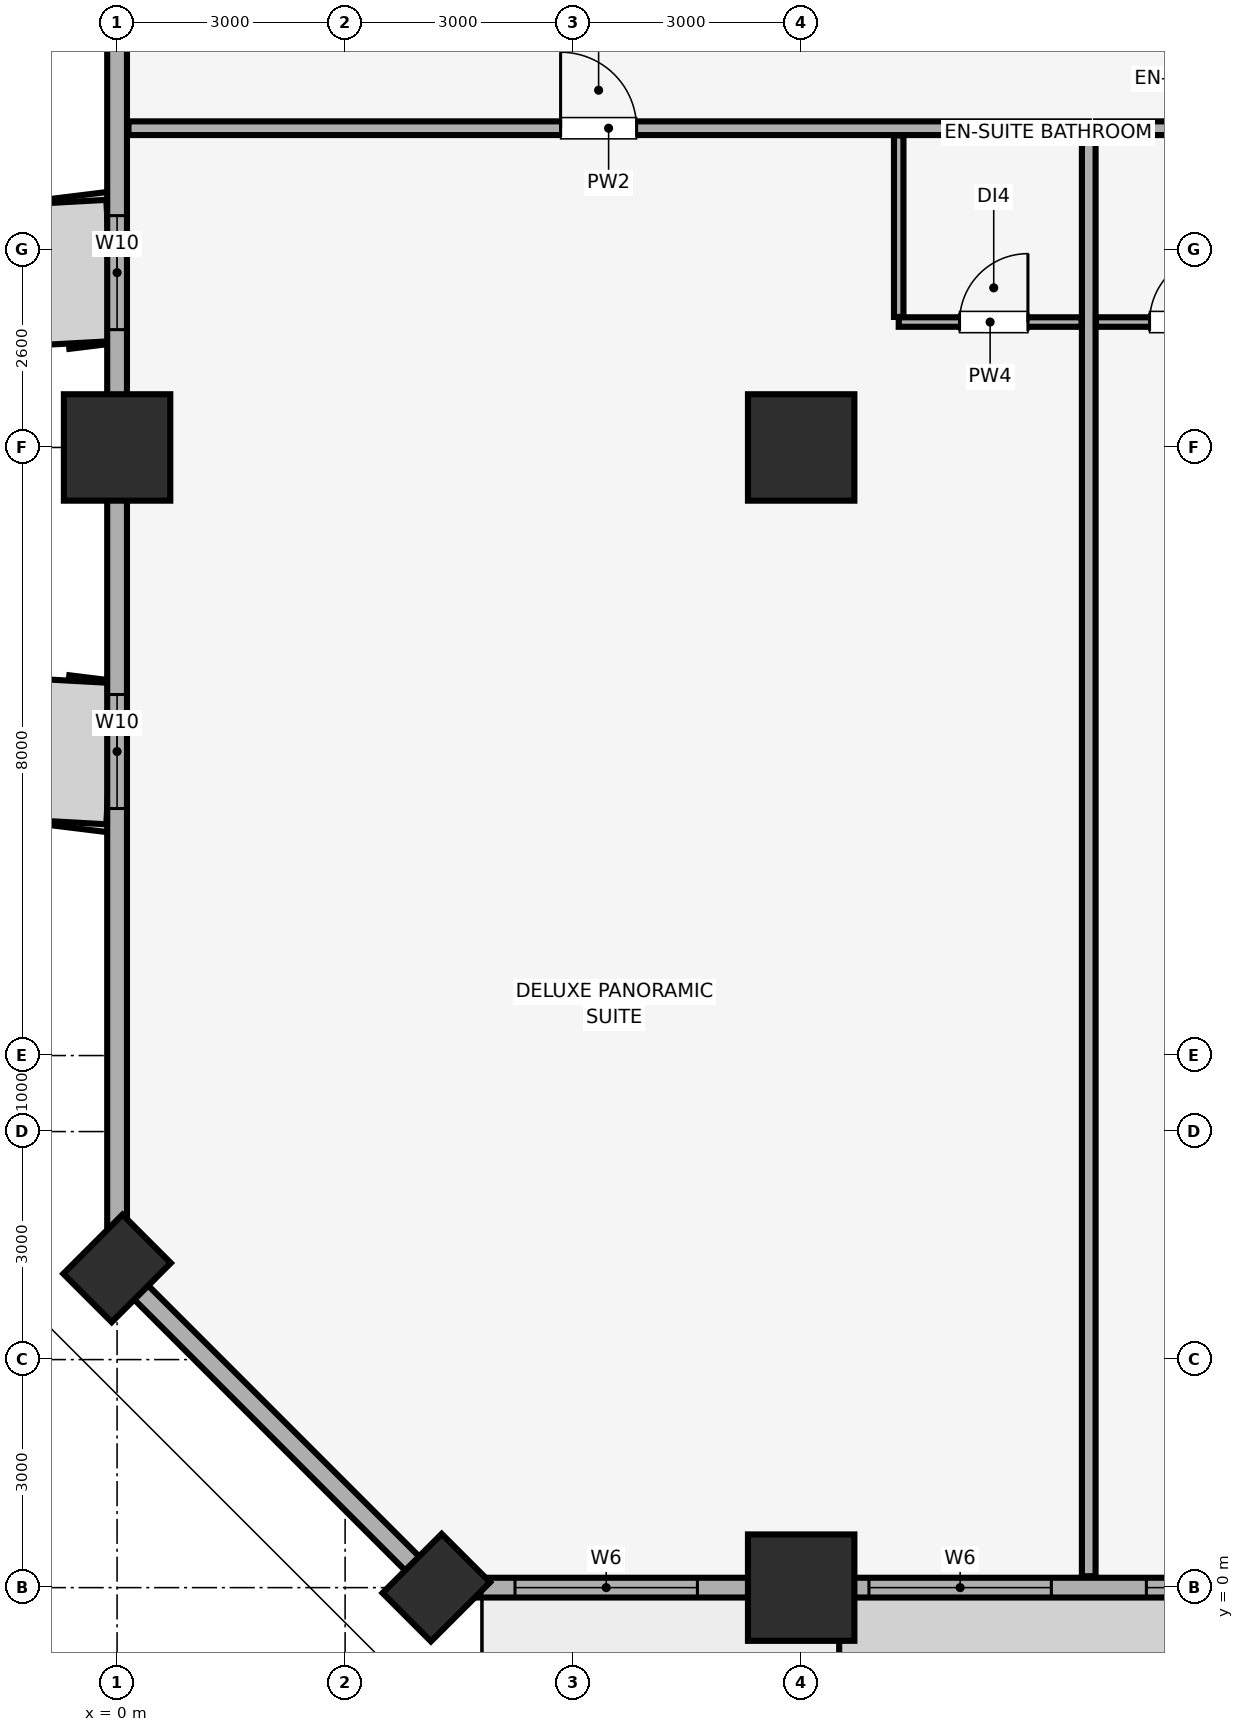
"""IFC4 building model, lengths in metres.
Left out: names, types, materials, properties, quantities, classifications, styles, units other than length and angle.
Written with IfcOpenShell. Run it as: python <this file> out.ifc"""

import sys

from ifc_helpers import new_model, si_unit, direction, frame, frame_2d, origin, origin_2d, place, context, subcontext, project, spatial, rectangle, extrude, element, fill, save


model = new_model("IFC4")
c1 = context("Model", 3, precision=1e-05, world=origin(), true_north=direction((0.0, 1.0)))
c2 = subcontext(c1, "Body", "Model", "MODEL_VIEW")
j1 = project(units=[si_unit("LENGTHUNIT", "METRE"), si_unit("PLANEANGLEUNIT", "RADIAN")], contexts=[c1])
p1 = place(None, origin())
s1 = spatial("IfcSite", under=j1, at=p1, CompositionType="ELEMENT")
p2 = place(p1, origin())
s2 = spatial("IfcBuilding", under=s1, at=p2, CompositionType="ELEMENT")
p3 = place(p2, frame((0.0, 0.0, 72.65)))
s3 = spatial("IfcBuildingStorey", under=s2, at=p3, CompositionType="ELEMENT", Elevation=72.65)
for number, where, z_axis, x_axis in (
    (1, (9.0, 0.0, 0.0), (0.0, 0.0, 1.0), (1.0, 0.0, 0.0)),
    (2, (0.0, 15.0, 0.0), (0.0, 0.0, 1.0), (1.0, 0.0, 0.0)),
):
    element("IfcColumn", number, at=place(p3, frame(where, z_axis=z_axis, x_axis=x_axis)), inside=s3, PredefinedType="COLUMN", context=c2, shape_type="SweptSolid", body=[
        extrude(rectangle(XDim=1.4, YDim=1.4, at=origin_2d()), origin(), (0.0, 0.0, 1.0), 3.51),
    ])
for number, where, z_axis, x_axis in (
    (3, (4.2, 0.0, 0.0), (0.0, 0.0, 1.0), (0.707, 0.707, 0.0)),
    (4, (0.0, 4.2, 0.0), (0.0, 0.0, 1.0), (0.707, 0.707, 0.0)),
):
    element("IfcColumn", number, at=place(p3, frame(where, z_axis=z_axis, x_axis=x_axis)), inside=s3, PredefinedType="PILASTER", context=c2, shape_type="SweptSolid", body=[
        extrude(rectangle(XDim=1.1, YDim=0.9, at=origin_2d()), origin(), (0.0, 0.0, 1.0), 3.51),
    ])
p4 = place(p3, frame((9.0, 15.0, 0.0), z_axis=(0.0, 0.0, 1.0), x_axis=(1.0, 0.0, 0.0)))
e5 = element("IfcColumn", 5, at=p4, inside=s3, PredefinedType="COLUMN", context=c2, shape_type="SweptSolid", body=[
    extrude(rectangle(XDim=1.4, YDim=1.4, at=origin_2d()), origin(), (0.0, 0.0, 1.0), 3.51),
])
p5 = place(p3, frame((4.2, 0.0, 0.0), z_axis=(0.0, 0.0, 1.0), x_axis=(1.0, 0.0, 0.0)))
e6 = element("IfcWall", 6, at=p5, inside=s3, PredefinedType="SOLIDWALL", context=c2, shape_type="SweptSolid", body=[
    extrude(rectangle(XDim=75.6, YDim=0.26, at=frame_2d((37.8, 0.0))), origin(), (0.0, 0.0, 1.0), 2.56),
])
p6 = place(p5, frame((21.383, 0.0, 0.0)))
e7 = element("IfcOpeningElement", 7, at=p6, cuts=e6, PredefinedType="OPENING", context=c2, shape_type="SweptSolid", body=[
    extrude(rectangle(XDim=1.1, YDim=2.15, at=frame_2d((0.55, 1.075))), frame((0.0, 0.14, 0.0), z_axis=(0.0, -1.0, 0.0), x_axis=(1.0, 0.0, 0.0)), (0.0, 0.0, 1.0), 0.28),
])
p7 = place(p5, frame((37.25, 0.0, 0.0)))
e8 = element("IfcOpeningElement", 8, at=p7, cuts=e6, PredefinedType="OPENING", context=c2, shape_type="SweptSolid", body=[
    extrude(rectangle(XDim=1.1, YDim=2.15, at=frame_2d((0.55, 1.075))), frame((0.0, 0.14, 0.0), z_axis=(0.0, -1.0, 0.0), x_axis=(1.0, 0.0, 0.0)), (0.0, 0.0, 1.0), 0.28),
])
p8 = place(p5, frame((53.117, 0.0, 0.0)))
e9 = element("IfcOpeningElement", 9, at=p8, cuts=e6, PredefinedType="OPENING", context=c2, shape_type="SweptSolid", body=[
    extrude(rectangle(XDim=1.1, YDim=2.15, at=frame_2d((0.55, 1.075))), frame((0.0, 0.14, 0.0), z_axis=(0.0, -1.0, 0.0), x_axis=(1.0, 0.0, 0.0)), (0.0, 0.0, 1.0), 0.28),
])
p9 = place(p5, frame((1.035, 0.0, 0.85)))
e10 = element("IfcOpeningElement", 10, at=p9, cuts=e6, PredefinedType="OPENING", context=c2, shape_type="SweptSolid", body=[
    extrude(rectangle(XDim=2.4, YDim=1.5, at=frame_2d((1.2, 0.75))), frame((0.0, 0.14, 0.0), z_axis=(0.0, -1.0, 0.0), x_axis=(1.0, 0.0, 0.0)), (0.0, 0.0, 1.0), 0.28),
])
p10 = place(p5, frame((5.691, 0.0, 0.85)))
e11 = element("IfcOpeningElement", 11, at=p10, cuts=e6, PredefinedType="OPENING", context=c2, shape_type="SweptSolid", body=[
    extrude(rectangle(XDim=2.4, YDim=1.5, at=frame_2d((1.2, 0.75))), frame((0.0, 0.14, 0.0), z_axis=(0.0, -1.0, 0.0), x_axis=(1.0, 0.0, 0.0)), (0.0, 0.0, 1.0), 0.28),
])
p11 = place(p5, frame((9.342, 0.0, 0.85)))
e12 = element("IfcOpeningElement", 12, at=p11, cuts=e6, PredefinedType="OPENING", context=c2, shape_type="SweptSolid", body=[
    extrude(rectangle(XDim=1.5, YDim=1.4, at=frame_2d((0.75, 0.7))), frame((0.0, 0.14, 0.0), z_axis=(0.0, -1.0, 0.0), x_axis=(1.0, 0.0, 0.0)), (0.0, 0.0, 1.0), 0.28),
])
p12 = place(p5, frame((13.458, 0.0, 0.85)))
e13 = element("IfcOpeningElement", 13, at=p12, cuts=e6, PredefinedType="OPENING", context=c2, shape_type="SweptSolid", body=[
    extrude(rectangle(XDim=2.4, YDim=1.5, at=frame_2d((1.2, 0.75))), frame((0.0, 0.14, 0.0), z_axis=(0.0, -1.0, 0.0), x_axis=(1.0, 0.0, 0.0)), (0.0, 0.0, 1.0), 0.28),
])
p13 = place(p5, frame((23.202, 0.0, 0.85)))
e14 = element("IfcOpeningElement", 14, at=p13, cuts=e6, PredefinedType="OPENING", context=c2, shape_type="SweptSolid", body=[
    extrude(rectangle(XDim=1.5, YDim=1.4, at=frame_2d((0.75, 0.7))), frame((0.0, 0.14, 0.0), z_axis=(0.0, -1.0, 0.0), x_axis=(1.0, 0.0, 0.0)), (0.0, 0.0, 1.0), 0.28),
])
p14 = place(p5, frame((28.8, 0.0, 0.85)))
e15 = element("IfcOpeningElement", 15, at=p14, cuts=e6, PredefinedType="OPENING", context=c2, shape_type="SweptSolid", body=[
    extrude(rectangle(XDim=2.4, YDim=1.5, at=frame_2d((1.2, 0.75))), frame((0.0, 0.14, 0.0), z_axis=(0.0, -1.0, 0.0), x_axis=(1.0, 0.0, 0.0)), (0.0, 0.0, 1.0), 0.28),
])
p15 = place(p5, frame((34.79, 0.0, 0.85)))
e16 = element("IfcOpeningElement", 16, at=p15, cuts=e6, PredefinedType="OPENING", context=c2, shape_type="SweptSolid", body=[
    extrude(rectangle(XDim=1.5, YDim=1.4, at=frame_2d((0.75, 0.7))), frame((0.0, 0.14, 0.0), z_axis=(0.0, -1.0, 0.0), x_axis=(1.0, 0.0, 0.0)), (0.0, 0.0, 1.0), 0.28),
])
p16 = place(p5, frame((39.31, 0.0, 0.85)))
e17 = element("IfcOpeningElement", 17, at=p16, cuts=e6, PredefinedType="OPENING", context=c2, shape_type="SweptSolid", body=[
    extrude(rectangle(XDim=1.5, YDim=1.4, at=frame_2d((0.75, 0.7))), frame((0.0, 0.14, 0.0), z_axis=(0.0, -1.0, 0.0), x_axis=(1.0, 0.0, 0.0)), (0.0, 0.0, 1.0), 0.28),
])
p17 = place(p5, frame((44.4, 0.0, 0.85)))
e18 = element("IfcOpeningElement", 18, at=p17, cuts=e6, PredefinedType="OPENING", context=c2, shape_type="SweptSolid", body=[
    extrude(rectangle(XDim=2.4, YDim=1.5, at=frame_2d((1.2, 0.75))), frame((0.0, 0.14, 0.0), z_axis=(0.0, -1.0, 0.0), x_axis=(1.0, 0.0, 0.0)), (0.0, 0.0, 1.0), 0.28),
])
p18 = place(p5, frame((50.848, 0.0, 0.85)))
e19 = element("IfcOpeningElement", 19, at=p18, cuts=e6, PredefinedType="OPENING", context=c2, shape_type="SweptSolid", body=[
    extrude(rectangle(XDim=1.5, YDim=1.4, at=frame_2d((0.75, 0.7))), frame((0.0, 0.14, 0.0), z_axis=(0.0, -1.0, 0.0), x_axis=(1.0, 0.0, 0.0)), (0.0, 0.0, 1.0), 0.28),
])
p19 = place(p5, frame((59.691, 0.0, 0.85)))
e20 = element("IfcOpeningElement", 20, at=p19, cuts=e6, PredefinedType="OPENING", context=c2, shape_type="SweptSolid", body=[
    extrude(rectangle(XDim=2.4, YDim=1.5, at=frame_2d((1.2, 0.75))), frame((0.0, 0.14, 0.0), z_axis=(0.0, -1.0, 0.0), x_axis=(1.0, 0.0, 0.0)), (0.0, 0.0, 1.0), 0.28),
])
p20 = place(p5, frame((64.708, 0.0, 0.85)))
e21 = element("IfcOpeningElement", 21, at=p20, cuts=e6, PredefinedType="OPENING", context=c2, shape_type="SweptSolid", body=[
    extrude(rectangle(XDim=1.5, YDim=1.4, at=frame_2d((0.75, 0.7))), frame((0.0, 0.14, 0.0), z_axis=(0.0, -1.0, 0.0), x_axis=(1.0, 0.0, 0.0)), (0.0, 0.0, 1.0), 0.28),
])
p21 = place(p5, frame((67.458, 0.0, 0.85)))
e22 = element("IfcOpeningElement", 22, at=p21, cuts=e6, PredefinedType="OPENING", context=c2, shape_type="SweptSolid", body=[
    extrude(rectangle(XDim=2.4, YDim=1.5, at=frame_2d((1.2, 0.75))), frame((0.0, 0.14, 0.0), z_axis=(0.0, -1.0, 0.0), x_axis=(1.0, 0.0, 0.0)), (0.0, 0.0, 1.0), 0.28),
])
p22 = place(p5, frame((72.165, 0.0, 0.85)))
e23 = element("IfcOpeningElement", 23, at=p22, cuts=e6, PredefinedType="OPENING", context=c2, shape_type="SweptSolid", body=[
    extrude(rectangle(XDim=2.4, YDim=1.5, at=frame_2d((1.2, 0.75))), frame((0.0, 0.14, 0.0), z_axis=(0.0, -1.0, 0.0), x_axis=(1.0, 0.0, 0.0)), (0.0, 0.0, 1.0), 0.28),
])
p23 = place(p3, frame((0.0, 44.8, 0.0), z_axis=(0.0, 0.0, 1.0), x_axis=(0.0, -1.0, 0.0)))
e24 = element("IfcWall", 24, at=p23, inside=s3, PredefinedType="SOLIDWALL", context=c2, shape_type="SweptSolid", body=[
    extrude(rectangle(XDim=40.6, YDim=0.26, at=frame_2d((20.3, 0.0))), origin(), (0.0, 0.0, 1.0), 2.56),
])
p24 = place(p23, frame((33.05, 0.0, 0.85)))
e25 = element("IfcOpeningElement", 25, at=p24, cuts=e24, PredefinedType="OPENING", context=c2, shape_type="SweptSolid", body=[
    extrude(rectangle(XDim=1.5, YDim=1.4, at=frame_2d((0.75, 0.7))), frame((0.0, 0.14, 0.0), z_axis=(0.0, -1.0, 0.0), x_axis=(1.0, 0.0, 0.0)), (0.0, 0.0, 1.0), 0.28),
])
p25 = place(p23, frame((26.75, 0.0, 0.85)))
e26 = element("IfcOpeningElement", 26, at=p25, cuts=e24, PredefinedType="OPENING", context=c2, shape_type="SweptSolid", body=[
    extrude(rectangle(XDim=1.5, YDim=1.4, at=frame_2d((0.75, 0.7))), frame((0.0, 0.14, 0.0), z_axis=(0.0, -1.0, 0.0), x_axis=(1.0, 0.0, 0.0)), (0.0, 0.0, 1.0), 0.28),
])
p26 = place(p23, frame((16.935, 0.0, 0.85)))
e27 = element("IfcOpeningElement", 27, at=p26, cuts=e24, PredefinedType="OPENING", context=c2, shape_type="SweptSolid", body=[
    extrude(rectangle(XDim=1.5, YDim=1.4, at=frame_2d((0.75, 0.7))), frame((0.0, 0.14, 0.0), z_axis=(0.0, -1.0, 0.0), x_axis=(1.0, 0.0, 0.0)), (0.0, 0.0, 1.0), 0.28),
])
p27 = place(p23, frame((11.05, 0.0, 0.85)))
e28 = element("IfcOpeningElement", 28, at=p27, cuts=e24, PredefinedType="OPENING", context=c2, shape_type="SweptSolid", body=[
    extrude(rectangle(XDim=1.5, YDim=1.4, at=frame_2d((0.75, 0.7))), frame((0.0, 0.14, 0.0), z_axis=(0.0, -1.0, 0.0), x_axis=(1.0, 0.0, 0.0)), (0.0, 0.0, 1.0), 0.28),
])
p28 = place(p23, frame((6.35, 0.0, 0.85)))
e29 = element("IfcOpeningElement", 29, at=p28, cuts=e24, PredefinedType="OPENING", context=c2, shape_type="SweptSolid", body=[
    extrude(rectangle(XDim=1.5, YDim=1.4, at=frame_2d((0.75, 0.7))), frame((0.0, 0.14, 0.0), z_axis=(0.0, -1.0, 0.0), x_axis=(1.0, 0.0, 0.0)), (0.0, 0.0, 1.0), 0.28),
])
p29 = place(p23, frame((1.735, 0.0, 0.85)))
e30 = element("IfcOpeningElement", 30, at=p29, cuts=e24, PredefinedType="OPENING", context=c2, shape_type="SweptSolid", body=[
    extrude(rectangle(XDim=1.5, YDim=1.4, at=frame_2d((0.75, 0.7))), frame((0.0, 0.14, 0.0), z_axis=(0.0, -1.0, 0.0), x_axis=(1.0, 0.0, 0.0)), (0.0, 0.0, 1.0), 0.28),
])
p30 = place(p3, frame((0.0, 4.2, 0.0), z_axis=(0.0, 0.0, 1.0), x_axis=(0.707106781187, -0.707106781187, 0.0)))
e31 = element("IfcWall", 31, at=p30, inside=s3, PredefinedType="SOLIDWALL", context=c2, shape_type="SweptSolid", body=[
    extrude(rectangle(XDim=5.94, YDim=0.26, at=frame_2d((2.97, 0.0))), origin(), (0.0, 0.0, 1.0), 2.56),
])
p31 = place(p3, frame((0.15, 19.2, 0.0), z_axis=(0.0, 0.0, 1.0), x_axis=(1.0, 0.0, 0.0)))
e32 = element("IfcWall", 32, at=p31, inside=s3, PredefinedType="PARTITIONING", context=c2, shape_type="SweptSolid", body=[
    extrude(rectangle(XDim=12.633, YDim=0.18, at=frame_2d((6.317, 0.0))), origin(), (0.0, 0.0, 1.0), 3.51),
])
p32 = place(p31, frame((5.685, 0.0, 0.0)))
e33 = element("IfcOpeningElement", 33, at=p32, cuts=e32, PredefinedType="OPENING", context=c2, shape_type="SweptSolid", body=[
    extrude(rectangle(XDim=1.0, YDim=2.15, at=frame_2d((0.5, 1.075))), frame((0.0, 0.1, 0.0), z_axis=(0.0, -1.0, 0.0), x_axis=(1.0, 0.0, 0.0)), (0.0, 0.0, 1.0), 0.2),
])
p33 = place(p3, frame((12.783, 0.15, 0.0), z_axis=(0.0, 0.0, 1.0), x_axis=(0.0, 1.0, 0.0)))
e34 = element("IfcWall", 34, at=p33, inside=s3, PredefinedType="PARTITIONING", context=c2, shape_type="SweptSolid", body=[
    extrude(rectangle(XDim=18.955, YDim=0.18, at=frame_2d((9.478, 0.0))), origin(), (0.0, 0.0, 1.0), 2.898),
])
p34 = place(p3, frame((10.283, 16.65, 0.0), z_axis=(0.0, 0.0, 1.0), x_axis=(1.0, 0.0, 0.0)))
e35 = element("IfcWall", 35, at=p34, inside=s3, PredefinedType="PARTITIONING", context=c2, shape_type="SweptSolid", body=[
    extrude(rectangle(XDim=2.405, YDim=0.125, at=frame_2d((1.203, 0.0))), origin(), (0.0, 0.0, 1.0), 3.51),
])
p35 = place(p34, frame((0.8, 0.0, 0.0)))
e36 = element("IfcOpeningElement", 36, at=p35, cuts=e35, PredefinedType="OPENING", context=c2, shape_type="SweptSolid", body=[
    extrude(rectangle(XDim=0.9, YDim=2.1, at=frame_2d((0.45, 1.05))), frame((0.0, 0.073, 0.0), z_axis=(0.0, -1.0, 0.0), x_axis=(1.0, 0.0, 0.0)), (0.0, 0.0, 1.0), 0.145),
])
p36 = place(p3, frame((10.283, 16.718, 0.0), z_axis=(0.0, 0.0, 1.0), x_axis=(0.0, 1.0, 0.0)))
e37 = element("IfcWall", 37, at=p36, inside=s3, PredefinedType="PARTITIONING", context=c2, shape_type="SweptSolid", body=[
    extrude(rectangle(XDim=2.387, YDim=0.125, at=frame_2d((1.194, 0.0))), origin(), (0.0, 0.0, 1.0), 3.51),
])
p37 = place(p3, frame((12.878, 19.2, 0.0), z_axis=(0.0, 0.0, 1.0), x_axis=(1.0, 0.0, 0.0)))
e38 = element("IfcWall", 38, at=p37, inside=s3, PredefinedType="PARTITIONING", context=c2, shape_type="SweptSolid", body=[
    extrude(rectangle(XDim=8.238, YDim=0.18, at=frame_2d((4.119, 0.0))), origin(), (0.0, 0.0, 1.0), 3.51),
])
p38 = place(p37, frame((5.67, 0.0, 0.0)))
e39 = element("IfcOpeningElement", 39, at=p38, cuts=e38, PredefinedType="OPENING", context=c2, shape_type="SweptSolid", body=[
    extrude(rectangle(XDim=1.0, YDim=2.15, at=frame_2d((0.5, 1.075))), frame((0.0, 0.1, 0.0), z_axis=(0.0, -1.0, 0.0), x_axis=(1.0, 0.0, 0.0)), (0.0, 0.0, 1.0), 0.2),
])
p39 = place(p3, frame((12.878, 16.65, 0.0), z_axis=(0.0, 0.0, 1.0), x_axis=(1.0, 0.0, 0.0)))
e40 = element("IfcWall", 40, at=p39, inside=s3, PredefinedType="PARTITIONING", context=c2, shape_type="SweptSolid", body=[
    extrude(rectangle(XDim=2.405, YDim=0.125, at=frame_2d((1.202, 0.0))), origin(), (0.0, 0.0, 1.0), 3.51),
])
p40 = place(p39, frame((0.705, 0.0, 0.0)))
e41 = element("IfcOpeningElement", 41, at=p40, cuts=e40, PredefinedType="OPENING", context=c2, shape_type="SweptSolid", body=[
    extrude(rectangle(XDim=0.9, YDim=2.1, at=frame_2d((0.45, 1.05))), frame((0.0, 0.073, 0.0), z_axis=(0.0, -1.0, 0.0), x_axis=(1.0, 0.0, 0.0)), (0.0, 0.0, 1.0), 0.145),
])
p41 = place(p9, origin())
e42 = element("IfcWindow", 42, at=p41, inside=s3, PartitioningType="SINGLE_PANEL", PredefinedType="WINDOW", context=c2, shape_type="SweptSolid", body=[
    extrude(rectangle(XDim=2.4, YDim=1.5, at=frame_2d((1.2, 0.75))), frame((0.0, 0.03, 0.0), z_axis=(0.0, -1.0, 0.0), x_axis=(1.0, 0.0, 0.0)), (0.0, 0.0, 1.0), 0.06),
])
fill(e10, e42)
p42 = place(p10, origin())
e43 = element("IfcWindow", 43, at=p42, inside=s3, PartitioningType="SINGLE_PANEL", PredefinedType="WINDOW", context=c2, shape_type="SweptSolid", body=[
    extrude(rectangle(XDim=2.4, YDim=1.5, at=frame_2d((1.2, 0.75))), frame((0.0, 0.03, 0.0), z_axis=(0.0, -1.0, 0.0), x_axis=(1.0, 0.0, 0.0)), (0.0, 0.0, 1.0), 0.06),
])
fill(e11, e43)
p43 = place(p11, origin())
e44 = element("IfcWindow", 44, at=p43, inside=s3, PartitioningType="SINGLE_PANEL", PredefinedType="WINDOW", context=c2, shape_type="SweptSolid", body=[
    extrude(rectangle(XDim=1.5, YDim=1.4, at=frame_2d((0.75, 0.7))), frame((0.0, 0.03, 0.0), z_axis=(0.0, -1.0, 0.0), x_axis=(1.0, 0.0, 0.0)), (0.0, 0.0, 1.0), 0.06),
])
fill(e12, e44)
p44 = place(p24, origin())
e45 = element("IfcWindow", 45, at=p44, inside=s3, PartitioningType="SINGLE_PANEL", PredefinedType="WINDOW", context=c2, shape_type="SweptSolid", body=[
    extrude(rectangle(XDim=1.5, YDim=1.4, at=frame_2d((0.75, 0.7))), frame((0.0, 0.03, 0.0), z_axis=(0.0, -1.0, 0.0), x_axis=(1.0, 0.0, 0.0)), (0.0, 0.0, 1.0), 0.06),
])
fill(e25, e45)
p45 = place(p25, origin())
e46 = element("IfcWindow", 46, at=p45, inside=s3, PartitioningType="SINGLE_PANEL", PredefinedType="WINDOW", context=c2, shape_type="SweptSolid", body=[
    extrude(rectangle(XDim=1.5, YDim=1.4, at=frame_2d((0.75, 0.7))), frame((0.0, 0.03, 0.0), z_axis=(0.0, -1.0, 0.0), x_axis=(1.0, 0.0, 0.0)), (0.0, 0.0, 1.0), 0.06),
])
fill(e26, e46)
p46 = place(p32, origin())
e47 = element("IfcDoor", 47, at=p46, inside=s3, OperationType="SINGLE_SWING_LEFT", PredefinedType="DOOR", context=c2, shape_type="SweptSolid", body=[
    extrude(rectangle(XDim=1.0, YDim=2.15, at=frame_2d((0.5, 1.075))), frame((0.0, 0.025, 0.0), z_axis=(0.0, -1.0, 0.0), x_axis=(1.0, 0.0, 0.0)), (0.0, 0.0, 1.0), 0.05),
])
fill(e33, e47)
p47 = place(p35, origin())
e48 = element("IfcDoor", 48, at=p47, inside=s3, OperationType="SINGLE_SWING_RIGHT", PredefinedType="DOOR", context=c2, shape_type="SweptSolid", body=[
    extrude(rectangle(XDim=0.9, YDim=2.1, at=frame_2d((0.45, 1.05))), frame((0.0, 0.025, 0.0), z_axis=(0.0, -1.0, 0.0), x_axis=(1.0, 0.0, 0.0)), (0.0, 0.0, 1.0), 0.05),
])
fill(e36, e48)
p48 = place(p40, origin())
e49 = element("IfcDoor", 49, at=p48, inside=s3, OperationType="SINGLE_SWING_RIGHT", PredefinedType="DOOR", context=c2, shape_type="SweptSolid", body=[
    extrude(rectangle(XDim=0.9, YDim=2.1, at=frame_2d((0.45, 1.05))), frame((0.0, 0.025, 0.0), z_axis=(0.0, -1.0, 0.0), x_axis=(1.0, 0.0, 0.0)), (0.0, 0.0, 1.0), 0.05),
])
fill(e41, e49)
save(model, sys.argv[1])
